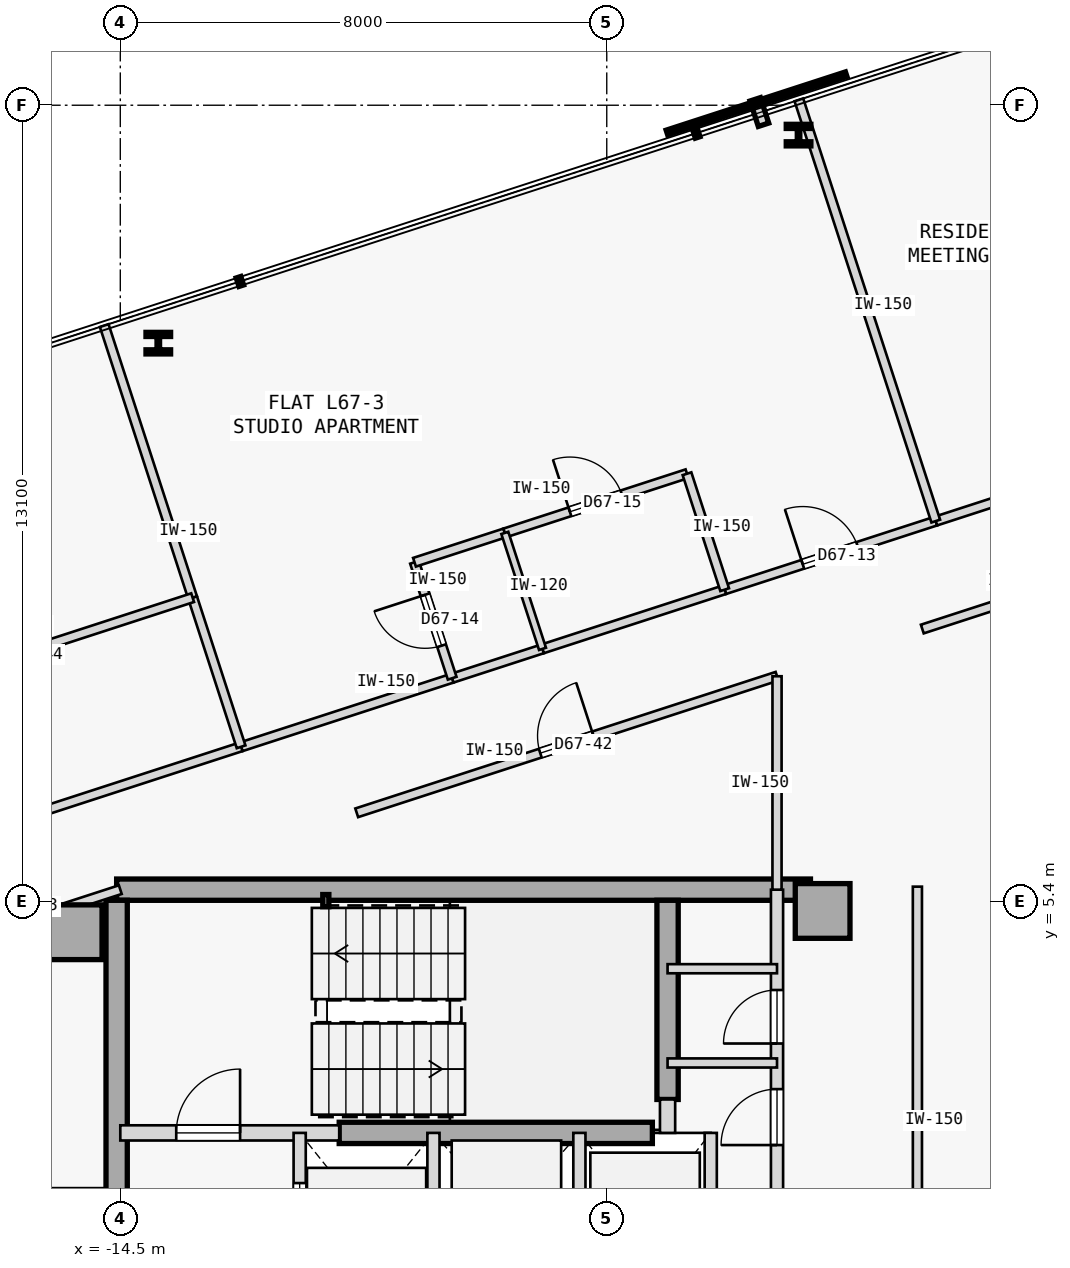
"""IFC4 building model, lengths in metres.
Left out: names, types, materials, properties, quantities, classifications, styles, units other than length and angle.
Written with IfcOpenShell. Run it as: python <this file> out.ifc"""

import sys

from ifc_helpers import new_model, si_unit, direction, frame, frame_2d, origin, origin_2d, place, context, subcontext, project, spatial, rectangle, hollow_rectangle, i_section, extrude, element, fill, save


model = new_model("IFC4")
c1 = context("Model", 3, precision=1e-05, world=origin(), true_north=direction((0.0, 1.0)))
c2 = subcontext(c1, "Body", "Model", "MODEL_VIEW")
j1 = project(units=[si_unit("LENGTHUNIT", "METRE"), si_unit("PLANEANGLEUNIT", "RADIAN")], contexts=[c1])
p1 = place(None, origin())
s1 = spatial("IfcSite", under=j1, at=p1, CompositionType="ELEMENT")
p2 = place(p1, origin())
s2 = spatial("IfcBuilding", under=s1, at=p2, CompositionType="ELEMENT")
p3 = place(p2, frame((0.0, 0.0, 251.1)))
s3 = spatial("IfcBuildingStorey", under=s2, at=p3, CompositionType="ELEMENT", Elevation=251.1)
for number, where, z_axis, x_axis in (
    (1, (-15.25, 4.9, 0.0), (0.0, 0.0, 1.0), (1.0, 0.0, 0.0)),
    (2, (-2.95, 5.25, 0.0), (0.0, 0.0, 1.0), (1.0, 0.0, 0.0)),
):
    element("IfcColumn", number, at=place(p3, frame(where, z_axis=z_axis, x_axis=x_axis)), inside=s3, PredefinedType="COLUMN", context=c2, shape_type="SweptSolid", body=[
        extrude(rectangle(XDim=0.9, YDim=0.9, at=origin_2d()), origin(), (0.0, 0.0, 1.0), 3.35),
    ])
p4 = place(p3, frame((-14.56, 5.6, 0.0), z_axis=(0.0, 0.0, 1.0), x_axis=(1.0, 0.0, 0.0)))
e3 = element("IfcWall", 3, at=p4, inside=s3, PredefinedType="SHEAR", context=c2, shape_type="SweptSolid", body=[
    extrude(rectangle(XDim=11.41, YDim=0.35, at=frame_2d((5.705, 0.0))), origin(), (0.0, 0.0, 1.0), 2.95),
])
p5 = place(p3, frame((-14.56, -5.425, 0.0), z_axis=(0.0, 0.0, 1.0), x_axis=(0.0, 1.0, 0.0)))
e4 = element("IfcWall", 4, at=p5, inside=s3, PredefinedType="SHEAR", context=c2, shape_type="SweptSolid", body=[
    extrude(rectangle(XDim=10.85, YDim=0.35, at=frame_2d((5.425, 0.0))), origin(), (0.0, 0.0, 1.0), 2.95),
])
p6 = place(p3, frame((-5.5, 2.15, 0.0), z_axis=(0.0, 0.0, 1.0), x_axis=(0.0, 1.0, 0.0)))
e5 = element("IfcWall", 5, at=p6, inside=s3, PredefinedType="SHEAR", context=c2, shape_type="SweptSolid", body=[
    extrude(rectangle(XDim=3.275, YDim=0.35, at=frame_2d((1.638, 0.0))), origin(), (0.0, 0.0, 1.0), 2.95),
])
p7 = place(p3, frame((-10.9, 1.6, 0.0), z_axis=(0.0, 0.0, 1.0), x_axis=(1.0, 0.0, 0.0)))
e6 = element("IfcWall", 6, at=p7, inside=s3, PredefinedType="SHEAR", context=c2, shape_type="SweptSolid", body=[
    extrude(rectangle(XDim=5.15, YDim=0.35, at=frame_2d((2.575, 0.0))), origin(), (0.0, 0.0, 1.0), 2.95),
])
p8 = place(p3, frame((-11.12, 5.42, 0.0), z_axis=(0.0, 0.0, 1.0), x_axis=(1.0, 0.0, 0.0)))
e7 = element("IfcColumn", 7, at=p8, inside=s3, PredefinedType="COLUMN", context=c2, shape_type="SweptSolid", body=[
    extrude(hollow_rectangle(XDim=0.1, YDim=0.2, WallThickness=0.008, at=origin_2d()), origin(), (0.0, 0.0, 1.0), 3.35),
])
for number, where, z_axis, x_axis in (
    (8, (-3.346, 18.009, 0.0), (0.0, 0.0, 1.0), (1.0, 0.0, 0.0)),
    (9, (-13.875, 14.587, 0.0), (0.0, 0.0, 1.0), (1.0, 0.0, 0.0)),
):
    element("IfcColumn", number, at=place(p3, frame(where, z_axis=z_axis, x_axis=x_axis)), inside=s3, PredefinedType="COLUMN", context=c2, shape_type="SweptSolid", body=[
        extrude(i_section(OverallWidth=0.405, OverallDepth=0.355, WebThickness=0.042, FlangeThickness=0.068, FilletRadius=0.015, at=origin_2d()), origin(), (0.0, 0.0, 1.0), 3.35),
    ])
p9 = place(p3, frame((-14.5, 1.6, 0.0), z_axis=(0.0, 0.0, 1.0), x_axis=(1.0, 0.0, 0.0)))
e10 = element("IfcWall", 10, at=p9, inside=s3, PredefinedType="STANDARD", context=c2, shape_type="SweptSolid", body=[
    extrude(rectangle(XDim=3.6, YDim=0.25, at=frame_2d((1.8, 0.0))), origin(), (0.0, 0.0, 1.0), 2.95),
])
p10 = place(p9, frame((0.92, 0.0, 0.0)))
e11 = element("IfcOpeningElement", 11, at=p10, cuts=e10, PredefinedType="OPENING", context=c2, shape_type="SweptSolid", body=[
    extrude(rectangle(XDim=1.05, YDim=2.15, at=frame_2d((0.525, 1.075))), frame((0.0, 0.135, 0.0), z_axis=(0.0, -1.0, 0.0), x_axis=(1.0, 0.0, 0.0)), (0.0, 0.0, 1.0), 0.27),
])
p11 = place(p3, frame((-5.5, 1.6, 0.0), z_axis=(0.0, 0.0, 1.0), x_axis=(0.0, 1.0, 0.0)))
e12 = element("IfcWall", 12, at=p11, inside=s3, PredefinedType="STANDARD", context=c2, shape_type="SweptSolid", body=[
    extrude(rectangle(XDim=0.55, YDim=0.25, at=frame_2d((0.275, 0.0))), origin(), (0.0, 0.0, 1.0), 2.95),
])
p12 = place(p3, frame((-3.7, -1.15, 0.0), z_axis=(0.0, 0.0, 1.0), x_axis=(0.0, 1.0, 0.0)))
e13 = element("IfcWall", 13, at=p12, inside=s3, PredefinedType="STANDARD", context=c2, shape_type="SweptSolid", body=[
    extrude(rectangle(XDim=6.75, YDim=0.2, at=frame_2d((3.375, 0.0))), origin(), (0.0, 0.0, 1.0), 2.95),
])
p13 = place(p12, frame((0.35, 0.0, 0.0)))
e14 = element("IfcOpeningElement", 14, at=p13, cuts=e13, PredefinedType="OPENING", context=c2, shape_type="SweptSolid", body=[
    extrude(rectangle(XDim=0.88, YDim=2.15, at=frame_2d((0.44, 1.075))), frame((0.0, 0.11, 0.0), z_axis=(0.0, -1.0, 0.0), x_axis=(1.0, 0.0, 0.0)), (0.0, 0.0, 1.0), 0.22),
])
p14 = place(p12, frame((2.55, 0.0, 0.0)))
e15 = element("IfcOpeningElement", 15, at=p14, cuts=e13, PredefinedType="OPENING", context=c2, shape_type="SweptSolid", body=[
    extrude(rectangle(XDim=0.92, YDim=2.15, at=frame_2d((0.46, 1.075))), frame((0.0, 0.11, 0.0), z_axis=(0.0, -1.0, 0.0), x_axis=(1.0, 0.0, 0.0)), (0.0, 0.0, 1.0), 0.22),
])
p15 = place(p12, frame((4.22, 0.0, 0.0)))
e16 = element("IfcOpeningElement", 16, at=p15, cuts=e13, PredefinedType="OPENING", context=c2, shape_type="SweptSolid", body=[
    extrude(rectangle(XDim=0.88, YDim=2.15, at=frame_2d((0.44, 1.075))), frame((0.0, 0.11, 0.0), z_axis=(0.0, -1.0, 0.0), x_axis=(1.0, 0.0, 0.0)), (0.0, 0.0, 1.0), 0.22),
])
p16 = place(p3, frame((-11.55, -1.15, 0.0), z_axis=(0.0, 0.0, 1.0), x_axis=(0.0, 1.0, 0.0)))
e17 = element("IfcWall", 17, at=p16, inside=s3, PredefinedType="STANDARD", context=c2, shape_type="SweptSolid", body=[
    extrude(rectangle(XDim=2.75, YDim=0.2, at=frame_2d((1.375, 0.0))), origin(), (0.0, 0.0, 1.0), 2.95),
])
p17 = place(p16, frame((0.825, 0.0, 0.0)))
e18 = element("IfcOpeningElement", 18, at=p17, cuts=e17, PredefinedType="OPENING", context=c2, shape_type="SweptSolid", body=[
    extrude(rectangle(XDim=1.1, YDim=2.15, at=frame_2d((0.55, 1.075))), frame((0.0, 0.11, 0.0), z_axis=(0.0, -1.0, 0.0), x_axis=(1.0, 0.0, 0.0)), (0.0, 0.0, 1.0), 0.22),
])
for number, where, z_axis, x_axis in (
    (19, (-9.35, -1.15, 0.0), (0.0, 0.0, 1.0), (0.0, 1.0, 0.0)),
    (20, (-6.95, -1.15, 0.0), (0.0, 0.0, 1.0), (0.0, 1.0, 0.0)),
    (21, (-4.79, -1.15, 0.0), (0.0, 0.0, 1.0), (0.0, 1.0, 0.0)),
):
    element("IfcWall", number, at=place(p3, frame(where, z_axis=z_axis, x_axis=x_axis)), inside=s3, PredefinedType="STANDARD", context=c2, shape_type="SweptSolid", body=[
        extrude(rectangle(XDim=2.75, YDim=0.2, at=frame_2d((1.375, 0.0))), origin(), (0.0, 0.0, 1.0), 2.95),
    ])
for number, where, z_axis, x_axis in (
    (22, (-5.5, 4.3, 0.0), (0.0, 0.0, 1.0), (1.0, 0.0, 0.0)),
    (23, (-5.5, 2.75, 0.0), (0.0, 0.0, 1.0), (1.0, 0.0, 0.0)),
):
    element("IfcWall", number, at=place(p3, frame(where, z_axis=z_axis, x_axis=x_axis)), inside=s3, PredefinedType="PARTITIONING", context=c2, shape_type="SweptSolid", body=[
        extrude(rectangle(XDim=1.8, YDim=0.15, at=frame_2d((0.9, 0.0))), origin(), (0.0, 0.0, 1.0), 2.95),
    ])
p18 = place(p3, frame((-1.391, -5.65, 0.0), z_axis=(0.0, 0.0, 1.0), x_axis=(-8.6422954e-05, 0.999999996266, 0.0)))
e24 = element("IfcWall", 24, at=p18, inside=s3, PredefinedType="PARTITIONING", context=c2, shape_type="SweptSolid", body=[
    extrude(rectangle(XDim=11.3, YDim=0.15, at=frame_2d((5.65, 0.0))), origin(), (0.0, 0.0, 1.0), 2.95),
])
p19 = place(p18, frame((5.175, 0.0, 0.0)))
e25 = element("IfcOpeningElement", 25, at=p19, cuts=e24, PredefinedType="OPENING", context=c2, shape_type="SweptSolid", body=[
    extrude(rectangle(XDim=0.95, YDim=2.15, at=frame_2d((0.475, 1.075))), frame((0.0, 0.085, 0.0), z_axis=(0.0, -1.0, 0.0), x_axis=(1.0, 0.0, 0.0)), (0.0, 0.0, 1.0), 0.17),
])
p20 = place(p3, frame((-12.513, 7.949, 0.0), z_axis=(0.0, 0.0, 1.0), x_axis=(0.951050780541, 0.309034646652, 0.0)))
e26 = element("IfcWall", 26, at=p20, inside=s3, PredefinedType="PARTITIONING", context=c2, shape_type="SweptSolid", body=[
    extrude(rectangle(XDim=3.65, YDim=0.15, at=frame_2d((1.825, 0.0))), origin(), (0.0, 0.0, 1.0), 2.95),
])
p21 = place(p3, frame((-4.561, 10.533, 0.0), z_axis=(0.0, 0.0, 1.0), x_axis=(0.951057168147, 0.309014988174, 0.0)))
e27 = element("IfcWall", 27, at=p21, inside=s3, PredefinedType="PARTITIONING", context=c2, shape_type="SweptSolid", body=[
    extrude(rectangle(XDim=3.65, YDim=0.15, at=frame_2d((1.825, 0.0))), origin(), (0.0, 0.0, 1.0), 2.95),
])
p22 = place(p21, frame((1.35, 0.0, 0.0)))
e28 = element("IfcOpeningElement", 28, at=p22, cuts=e27, PredefinedType="OPENING", context=c2, shape_type="SweptSolid", body=[
    extrude(rectangle(XDim=0.95, YDim=2.15, at=frame_2d((0.475, 1.075))), frame((0.0, 0.085, 0.0), z_axis=(0.0, -1.0, 0.0), x_axis=(1.0, 0.0, 0.0)), (0.0, 0.0, 1.0), 0.17),
])
p23 = place(p3, frame((-9.042, 9.077, 0.0), z_axis=(0.0, 0.0, 1.0), x_axis=(0.951062779317, 0.308997718112, 0.0)))
e29 = element("IfcWall", 29, at=p23, inside=s3, PredefinedType="PARTITIONING", context=c2, shape_type="SweptSolid", body=[
    extrude(rectangle(XDim=1.562, YDim=0.15, at=frame_2d((0.781, 0.0))), origin(), (0.0, 0.0, 1.0), 2.95),
])
p24 = place(p3, frame((-7.557, 9.56, 0.0), z_axis=(0.0, 0.0, 1.0), x_axis=(0.951058557014, 0.309010713619, 0.0)))
e30 = element("IfcWall", 30, at=p24, inside=s3, PredefinedType="PARTITIONING", context=c2, shape_type="SweptSolid", body=[
    extrude(rectangle(XDim=3.15, YDim=0.15, at=frame_2d((1.575, 0.0))), origin(), (0.0, 0.0, 1.0), 2.95),
])
p25 = place(p3, frame((-17.792, 4.531, 0.0), z_axis=(0.0, 0.0, 1.0), x_axis=(0.951047546178, 0.309044600193, 0.0)))
e31 = element("IfcWall", 31, at=p25, inside=s3, PredefinedType="PARTITIONING", context=c2, shape_type="SweptSolid", body=[
    extrude(rectangle(XDim=3.461, YDim=0.15, at=frame_2d((1.73, 0.0))), origin(), (0.0, 0.0, 1.0), 2.17),
])
p26 = place(p25, frame((0.302, 0.0, 0.0)))
e32 = element("IfcOpeningElement", 32, at=p26, cuts=e31, PredefinedType="OPENING", context=c2, shape_type="SweptSolid", body=[
    extrude(rectangle(XDim=0.92, YDim=2.15, at=frame_2d((0.46, 1.075))), frame((0.0, 0.085, 0.0), z_axis=(0.0, -1.0, 0.0), x_axis=(1.0, 0.0, 0.0)), (0.0, 0.0, 1.0), 0.17),
])
p27 = place(p3, frame((-1.311, 9.886, 0.0), z_axis=(0.0, 0.0, 1.0), x_axis=(0.951068803905, 0.308979174442, 0.0)))
e33 = element("IfcWall", 33, at=p27, inside=s3, PredefinedType="PARTITIONING", context=c2, shape_type="SweptSolid", body=[
    extrude(rectangle(XDim=3.46, YDim=0.15, at=frame_2d((1.73, 0.0))), origin(), (0.0, 0.0, 1.0), 2.95),
])
p28 = place(p3, frame((-10.612, 6.864, 0.0), z_axis=(0.0, 0.0, 1.0), x_axis=(0.951060972078, 0.309003280548, 0.0)))
e34 = element("IfcWall", 34, at=p28, inside=s3, PredefinedType="PARTITIONING", context=c2, shape_type="SweptSolid", body=[
    extrude(rectangle(XDim=7.268, YDim=0.15, at=frame_2d((3.634, 0.0))), origin(), (0.0, 0.0, 1.0), 2.95),
])
p29 = place(p28, frame((3.174, 0.0, 0.0)))
e35 = element("IfcOpeningElement", 35, at=p29, cuts=e34, PredefinedType="OPENING", context=c2, shape_type="SweptSolid", body=[
    extrude(rectangle(XDim=0.92, YDim=2.15, at=frame_2d((0.46, 1.075))), frame((0.0, 0.085, 0.0), z_axis=(0.0, -1.0, 0.0), x_axis=(1.0, 0.0, 0.0)), (0.0, 0.0, 1.0), 0.17),
])
p30 = place(p3, frame((-3.7, 5.6, 0.0), z_axis=(0.0, 0.0, 1.0), x_axis=(0.000139120755, 0.999999990323, 0.0)))
e36 = element("IfcWall", 36, at=p30, inside=s3, PredefinedType="PARTITIONING", context=c2, shape_type="SweptSolid", body=[
    extrude(rectangle(XDim=3.51, YDim=0.15, at=frame_2d((1.755, 0.0))), origin(), (0.0, 0.0, 1.0), 2.95),
])
p31 = place(p3, frame((-18.292, 6.072, 0.0), z_axis=(0.0, 0.0, 1.0), x_axis=(0.951062707515, 0.30899793911, 0.0)))
e37 = element("IfcWall", 37, at=p31, inside=s3, PredefinedType="PARTITIONING", context=c2, shape_type="SweptSolid", body=[
    extrude(rectangle(XDim=6.076, YDim=0.15, at=frame_2d((3.038, 0.0))), origin(), (0.0, 0.0, 1.0), 2.95),
])
p32 = place(p31, frame((0.877, 0.0, 0.0)))
e38 = element("IfcOpeningElement", 38, at=p32, cuts=e37, PredefinedType="OPENING", context=c2, shape_type="SweptSolid", body=[
    extrude(rectangle(XDim=0.92, YDim=2.15, at=frame_2d((0.46, 1.075))), frame((0.0, 0.085, 0.0), z_axis=(0.0, -1.0, 0.0), x_axis=(1.0, 0.0, 0.0)), (0.0, 0.0, 1.0), 0.17),
])
p33 = place(p3, frame((-1.089, 11.661, 0.0), z_axis=(0.0, 0.0, 1.0), x_axis=(0.951057158344, 0.309015018346, 0.0)))
e39 = element("IfcWall", 39, at=p33, inside=s3, PredefinedType="PARTITIONING", context=c2, shape_type="SweptSolid", body=[
    extrude(rectangle(XDim=4.118, YDim=0.15, at=frame_2d((2.059, 0.0))), origin(), (0.0, 0.0, 1.0), 2.95),
])
p34 = place(p33, frame((1.599, 0.0, 0.0)))
e40 = element("IfcOpeningElement", 40, at=p34, cuts=e39, PredefinedType="OPENING", context=c2, shape_type="SweptSolid", body=[
    extrude(rectangle(XDim=0.92, YDim=2.15, at=frame_2d((0.46, 1.075))), frame((0.0, 0.085, 0.0), z_axis=(0.0, -1.0, 0.0), x_axis=(1.0, 0.0, 0.0)), (0.0, 0.0, 1.0), 0.17),
])
p35 = place(p3, frame((-9.042, 9.077, 0.0), z_axis=(0.0, 0.0, 1.0), x_axis=(-0.308912611775, 0.951090425925, 0.0)))
e41 = element("IfcWall", 41, at=p35, inside=s3, PredefinedType="PARTITIONING", context=c2, shape_type="SweptSolid", body=[
    extrude(rectangle(XDim=2.005, YDim=0.15, at=frame_2d((1.002, 0.0))), origin(), (0.0, 0.0, 1.0), 2.95),
])
p36 = place(p35, frame((0.562, 0.0, 0.0)))
e42 = element("IfcOpeningElement", 42, at=p36, cuts=e41, PredefinedType="OPENING", context=c2, shape_type="SweptSolid", body=[
    extrude(rectangle(XDim=0.88, YDim=2.15, at=frame_2d((0.44, 1.075))), frame((0.0, 0.085, 0.0), z_axis=(0.0, -1.0, 0.0), x_axis=(1.0, 0.0, 0.0)), (0.0, 0.0, 1.0), 0.17),
])
p37 = place(p3, frame((-9.662, 10.984, 0.0), z_axis=(0.0, 0.0, 1.0), x_axis=(0.951047852885, 0.309043656337, 0.0)))
e43 = element("IfcWall", 43, at=p37, inside=s3, PredefinedType="PARTITIONING", context=c2, shape_type="SweptSolid", body=[
    extrude(rectangle(XDim=1.562, YDim=0.15, at=frame_2d((0.781, 0.0))), origin(), (0.0, 0.0, 1.0), 2.95),
])
p38 = place(p3, frame((-8.176, 11.467, 0.0), z_axis=(0.0, 0.0, 1.0), x_axis=(0.951058557014, 0.309010713619, 0.0)))
e44 = element("IfcWall", 44, at=p38, inside=s3, PredefinedType="PARTITIONING", context=c2, shape_type="SweptSolid", body=[
    extrude(rectangle(XDim=3.15, YDim=0.15, at=frame_2d((1.575, 0.0))), origin(), (0.0, 0.0, 1.0), 2.95),
])
p39 = place(p38, frame((1.125, 0.0, 0.0)))
e45 = element("IfcOpeningElement", 45, at=p39, cuts=e44, PredefinedType="OPENING", context=c2, shape_type="SweptSolid", body=[
    extrude(rectangle(XDim=0.9, YDim=2.15, at=frame_2d((0.45, 1.075))), frame((0.0, 0.085, 0.0), z_axis=(0.0, -1.0, 0.0), x_axis=(1.0, 0.0, 0.0)), (0.0, 0.0, 1.0), 0.17),
])
p40 = place(p3, frame((-4.561, 10.533, 0.0), z_axis=(0.0, 0.0, 1.0), x_axis=(-0.309022749039, 0.951054646472, 0.0)))
e46 = element("IfcWall", 46, at=p40, inside=s3, PredefinedType="PARTITIONING", context=c2, shape_type="SweptSolid", body=[
    extrude(rectangle(XDim=2.005, YDim=0.15, at=frame_2d((1.002, 0.0))), origin(), (0.0, 0.0, 1.0), 2.95),
])
p41 = place(p3, frame((-12.513, 7.949, 0.0), z_axis=(0.0, 0.0, 1.0), x_axis=(-0.309062527822, 0.951041720376, 0.0)))
e47 = element("IfcWall", 47, at=p41, inside=s3, PredefinedType="PARTITIONING", context=c2, shape_type="SweptSolid", body=[
    extrude(rectangle(XDim=2.579, YDim=0.15, at=frame_2d((1.29, 0.0))), origin(), (0.0, 0.0, 1.0), 2.95),
])
p42 = place(p3, frame((-13.311, 10.402, 0.0), z_axis=(0.0, 0.0, 1.0), x_axis=(-0.309010977541, 0.951058471262, 0.0)))
e48 = element("IfcWall", 48, at=p42, inside=s3, PredefinedType="PARTITIONING", context=c2, shape_type="SweptSolid", body=[
    extrude(rectangle(XDim=4.705, YDim=0.15, at=frame_2d((2.353, 0.0))), origin(), (0.0, 0.0, 1.0), 2.95),
])
p43 = place(p3, frame((-1.089, 11.661, 0.0), z_axis=(0.0, 0.0, 1.0), x_axis=(-0.309029230739, 0.951052540372, 0.0)))
e49 = element("IfcWall", 49, at=p43, inside=s3, PredefinedType="PARTITIONING", context=c2, shape_type="SweptSolid", body=[
    extrude(rectangle(XDim=7.284, YDim=0.15, at=frame_2d((3.642, 0.0))), origin(), (0.0, 0.0, 1.0), 2.95),
])
p44 = place(p3, frame((-7.557, 9.56, 0.0), z_axis=(0.0, 0.0, 1.0), x_axis=(-0.309022749039, 0.951054646472, 0.0)))
e50 = element("IfcWall", 50, at=p44, inside=s3, PredefinedType="PARTITIONING", context=c2, shape_type="SweptSolid", body=[
    extrude(rectangle(XDim=2.005, YDim=0.12, at=frame_2d((1.002, 0.0))), origin(), (0.0, 0.0, 1.0), 2.95),
])
p45 = place(p3, frame((-19.089, 8.524, 0.0), z_axis=(0.0, 0.0, 1.0), x_axis=(0.951050898488, 0.309034283674, 0.0)))
e51 = element("IfcWall", 51, at=p45, inside=s3, PredefinedType="PARTITIONING", context=c2, shape_type="SweptSolid", body=[
    extrude(rectangle(XDim=6.076, YDim=0.15, at=frame_2d((3.038, 0.0))), origin(), (0.0, 0.0, 1.0), 2.17),
])
p46 = place(p45, frame((2.578, 0.0, 0.0)))
e52 = element("IfcOpeningElement", 52, at=p46, cuts=e51, PredefinedType="OPENING", context=c2, shape_type="SweptSolid", body=[
    extrude(rectangle(XDim=0.92, YDim=2.15, at=frame_2d((0.46, 1.075))), frame((0.0, 0.085, 0.0), z_axis=(0.0, -1.0, 0.0), x_axis=(1.0, 0.0, 0.0)), (0.0, 0.0, 1.0), 0.17),
])
p47 = place(p10, origin())
e53 = element("IfcDoor", 53, at=p47, inside=s3, OperationType="SINGLE_SWING_RIGHT", PredefinedType="DOOR", context=c2, shape_type="SweptSolid", body=[
    extrude(rectangle(XDim=1.05, YDim=2.15, at=frame_2d((0.525, 1.075))), frame((0.0, 0.025, 0.0), z_axis=(0.0, -1.0, 0.0), x_axis=(1.0, 0.0, 0.0)), (0.0, 0.0, 1.0), 0.05),
])
fill(e11, e53)
p48 = place(p17, origin())
e54 = element("IfcDoor", 54, at=p48, inside=s3, OperationType="SLIDING_TO_RIGHT", PredefinedType="DOOR", context=c2, shape_type="SweptSolid", body=[
    extrude(rectangle(XDim=1.1, YDim=2.15, at=frame_2d((0.55, 1.075))), frame((0.0, 0.025, 0.0), z_axis=(0.0, -1.0, 0.0), x_axis=(1.0, 0.0, 0.0)), (0.0, 0.0, 1.0), 0.05),
])
fill(e18, e54)
p49 = place(p14, origin())
e55 = element("IfcDoor", 55, at=p49, inside=s3, OperationType="SINGLE_SWING_LEFT", PredefinedType="DOOR", context=c2, shape_type="SweptSolid", body=[
    extrude(rectangle(XDim=0.92, YDim=2.15, at=frame_2d((0.46, 1.075))), frame((0.0, 0.025, 0.0), z_axis=(0.0, -1.0, 0.0), x_axis=(1.0, 0.0, 0.0)), (0.0, 0.0, 1.0), 0.05),
])
fill(e15, e55)
p50 = place(p15, origin())
e56 = element("IfcDoor", 56, at=p50, inside=s3, OperationType="SINGLE_SWING_LEFT", PredefinedType="DOOR", context=c2, shape_type="SweptSolid", body=[
    extrude(rectangle(XDim=0.88, YDim=2.15, at=frame_2d((0.44, 1.075))), frame((0.0, 0.025, 0.0), z_axis=(0.0, -1.0, 0.0), x_axis=(1.0, 0.0, 0.0)), (0.0, 0.0, 1.0), 0.05),
])
fill(e16, e56)
p51 = place(p22, origin())
e57 = element("IfcDoor", 57, at=p51, inside=s3, OperationType="SINGLE_SWING_LEFT", PredefinedType="DOOR", context=c2, shape_type="SweptSolid", body=[
    extrude(rectangle(XDim=0.95, YDim=2.15, at=frame_2d((0.475, 1.075))), frame((0.0, 0.025, 0.0), z_axis=(0.0, -1.0, 0.0), x_axis=(1.0, 0.0, 0.0)), (0.0, 0.0, 1.0), 0.05),
])
fill(e28, e57)
p52 = place(p36, origin())
e58 = element("IfcDoor", 58, at=p52, inside=s3, OperationType="SINGLE_SWING_RIGHT", PredefinedType="DOOR", context=c2, shape_type="SweptSolid", body=[
    extrude(rectangle(XDim=0.88, YDim=2.15, at=frame_2d((0.44, 1.075))), frame((0.0, 0.025, 0.0), z_axis=(0.0, -1.0, 0.0), x_axis=(1.0, 0.0, 0.0)), (0.0, 0.0, 1.0), 0.05),
])
fill(e42, e58)
p53 = place(p39, origin())
e59 = element("IfcDoor", 59, at=p53, inside=s3, OperationType="SINGLE_SWING_LEFT", PredefinedType="DOOR", context=c2, shape_type="SweptSolid", body=[
    extrude(rectangle(XDim=0.9, YDim=2.15, at=frame_2d((0.45, 1.075))), frame((0.0, 0.025, 0.0), z_axis=(0.0, -1.0, 0.0), x_axis=(1.0, 0.0, 0.0)), (0.0, 0.0, 1.0), 0.05),
])
fill(e45, e59)
p54 = place(p29, origin())
e60 = element("IfcDoor", 60, at=p54, inside=s3, OperationType="SINGLE_SWING_RIGHT", PredefinedType="DOOR", context=c2, shape_type="SweptSolid", body=[
    extrude(rectangle(XDim=0.92, YDim=2.15, at=frame_2d((0.46, 1.075))), frame((0.0, 0.025, 0.0), z_axis=(0.0, -1.0, 0.0), x_axis=(1.0, 0.0, 0.0)), (0.0, 0.0, 1.0), 0.05),
])
fill(e35, e60)
save(model, sys.argv[1])
